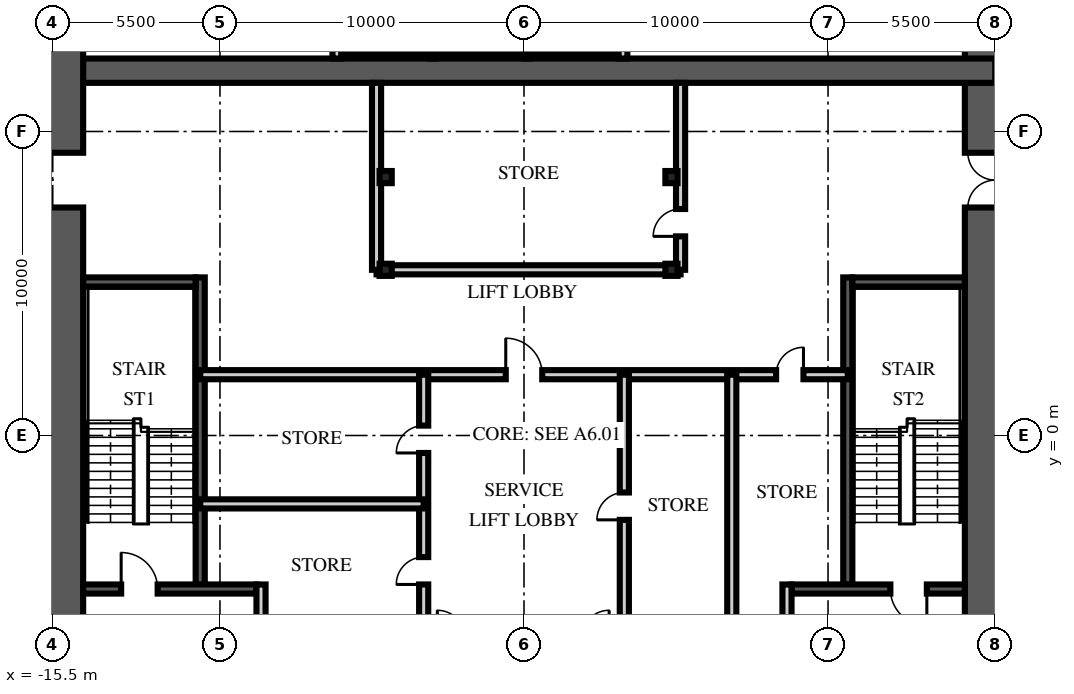
"""IFC4 building model, lengths in metres.
Left out: names, types, materials, properties, quantities, classifications, styles, units other than length and angle.
Written with IfcOpenShell. Run it as: python <this file> out.ifc"""

import sys

from ifc_helpers import new_model, si_unit, direction, frame, frame_2d, origin, origin_2d, place, context, subcontext, project, spatial, rectangle, extrude, element, fill, save


model = new_model("IFC4")
c1 = context("Model", 3, precision=1e-05, world=origin(), true_north=direction((0.0, 1.0)))
c2 = subcontext(c1, "Body", "Model", "MODEL_VIEW")
j1 = project(units=[si_unit("LENGTHUNIT", "METRE"), si_unit("PLANEANGLEUNIT", "RADIAN")], contexts=[c1])
p1 = place(None, origin())
s1 = spatial("IfcSite", under=j1, at=p1, CompositionType="ELEMENT")
p2 = place(p1, origin())
s2 = spatial("IfcBuilding", under=s1, at=p2, CompositionType="ELEMENT")
p3 = place(p2, frame((0.0, 0.0, -13.2)))
s3 = spatial("IfcBuildingStorey", under=s2, at=p3, CompositionType="ELEMENT", Elevation=-13.2)
p4 = place(p3, frame((15.5, -15.5, -0.4), z_axis=(0.0, 0.0, 1.0), x_axis=(0.0, 1.0, 0.0)))
e1 = element("IfcWall", 1, at=p4, inside=s3, PredefinedType="SHEAR", context=c2, shape_type="SweptSolid", body=[
    extrude(rectangle(XDim=31.0, YDim=2.0, at=frame_2d((15.5, 0.0))), origin(), (0.0, 0.0, 1.0), 4.3),
])
p5 = place(p4, frame((6.5, 0.0, 0.4)))
e2 = element("IfcOpeningElement", 2, at=p5, cuts=e1, PredefinedType="OPENING", context=c2, shape_type="SweptSolid", body=[
    extrude(rectangle(XDim=1.2, YDim=2.1, at=frame_2d((0.6, 1.05))), frame((0.0, 1.01, 0.0), z_axis=(0.0, -1.0, 0.0), x_axis=(1.0, 0.0, 0.0)), (0.0, 0.0, 1.0), 2.02),
])
p6 = place(p4, frame((23.0, 0.0, 0.4)))
e3 = element("IfcOpeningElement", 3, at=p6, cuts=e1, PredefinedType="OPENING", context=c2, shape_type="SweptSolid", body=[
    extrude(rectangle(XDim=1.8, YDim=2.1, at=frame_2d((0.9, 1.05))), frame((0.0, 1.01, 0.0), z_axis=(0.0, -1.0, 0.0), x_axis=(1.0, 0.0, 0.0)), (0.0, 0.0, 1.0), 2.02),
])
p7 = place(p3, frame((-15.5, 12.0, -0.4), z_axis=(0.0, 0.0, 1.0), x_axis=(1.0, 0.0, 0.0)))
e4 = element("IfcWall", 4, at=p7, inside=s3, PredefinedType="SHEAR", context=c2, shape_type="SweptSolid", body=[
    extrude(rectangle(XDim=31.0, YDim=0.8, at=frame_2d((15.5, 0.0))), origin(), (0.0, 0.0, 1.0), 4.3),
])
p8 = place(p3, frame((-15.5, -15.5, -0.4), z_axis=(0.0, 0.0, 1.0), x_axis=(0.0, 1.0, 0.0)))
e5 = element("IfcWall", 5, at=p8, inside=s3, PredefinedType="SHEAR", context=c2, shape_type="SweptSolid", body=[
    extrude(rectangle(XDim=31.0, YDim=2.0, at=frame_2d((15.5, 0.0))), origin(), (0.0, 0.0, 1.0), 4.3),
])
p9 = place(p8, frame((6.5, 0.0, 0.4)))
e6 = element("IfcOpeningElement", 6, at=p9, cuts=e5, PredefinedType="OPENING", context=c2, shape_type="SweptSolid", body=[
    extrude(rectangle(XDim=1.2, YDim=2.1, at=frame_2d((0.6, 1.05))), frame((0.0, 1.01, 0.0), z_axis=(0.0, -1.0, 0.0), x_axis=(1.0, 0.0, 0.0)), (0.0, 0.0, 1.0), 2.02),
])
p10 = place(p8, frame((23.0, 0.0, 0.4)))
e7 = element("IfcOpeningElement", 7, at=p10, cuts=e5, PredefinedType="OPENING", context=c2, shape_type="SweptSolid", body=[
    extrude(rectangle(XDim=1.8, YDim=2.1, at=frame_2d((0.9, 1.05))), frame((0.0, 1.01, 0.0), z_axis=(0.0, -1.0, 0.0), x_axis=(1.0, 0.0, 0.0)), (0.0, 0.0, 1.0), 2.02),
])
p11 = place(p3, frame((-10.65, -4.9, 0.0), z_axis=(0.0, 0.0, 1.0), x_axis=(0.0, 1.0, 0.0)))
e8 = element("IfcWall", 8, at=p11, inside=s3, PredefinedType="SOLIDWALL", context=c2, shape_type="SweptSolid", body=[
    extrude(rectangle(XDim=10.1, YDim=0.3, at=frame_2d((5.05, 0.0))), origin(), (0.0, 0.0, 1.0), 3.9),
])
p12 = place(p3, frame((-14.5, -5.05, 0.0), z_axis=(0.0, 0.0, 1.0), x_axis=(1.0, 0.0, 0.0)))
e9 = element("IfcWall", 9, at=p12, inside=s3, PredefinedType="SOLIDWALL", context=c2, shape_type="SweptSolid", body=[
    extrude(rectangle(XDim=5.7, YDim=0.3, at=frame_2d((2.85, 0.0))), origin(), (0.0, 0.0, 1.0), 3.9),
])
p13 = place(p12, frame((1.25, 0.0, 0.0)))
e10 = element("IfcOpeningElement", 10, at=p13, cuts=e9, PredefinedType="OPENING", context=c2, shape_type="SweptSolid", body=[
    extrude(rectangle(XDim=1.2, YDim=2.1, at=frame_2d((0.6, 1.05))), frame((0.0, 0.16, 0.0), z_axis=(0.0, -1.0, 0.0), x_axis=(1.0, 0.0, 0.0)), (0.0, 0.0, 1.0), 0.32),
])
p14 = place(p3, frame((-14.5, 5.05, 0.0), z_axis=(0.0, 0.0, 1.0), x_axis=(1.0, 0.0, 0.0)))
e11 = element("IfcWall", 11, at=p14, inside=s3, PredefinedType="SOLIDWALL", context=c2, shape_type="SweptSolid", body=[
    extrude(rectangle(XDim=3.7, YDim=0.3, at=frame_2d((1.85, 0.0))), origin(), (0.0, 0.0, 1.0), 3.9),
])
p15 = place(p3, frame((-8.65, -11.6, 0.0), z_axis=(0.0, 0.0, 1.0), x_axis=(0.0, 1.0, 0.0)))
e12 = element("IfcWall", 12, at=p15, inside=s3, PredefinedType="PARTITIONING", context=c2, shape_type="SweptSolid", body=[
    extrude(rectangle(XDim=6.7, YDim=0.3, at=frame_2d((3.35, 0.0))), origin(), (0.0, 0.0, 1.0), 3.9),
])
p16 = place(p15, frame((2.85, 0.0, 0.0)))
e13 = element("IfcOpeningElement", 13, at=p16, cuts=e12, PredefinedType="OPENING", context=c2, shape_type="SweptSolid", body=[
    extrude(rectangle(XDim=1.1, YDim=2.1, at=frame_2d((0.55, 1.05))), frame((0.0, 0.16, 0.0), z_axis=(0.0, -1.0, 0.0), x_axis=(1.0, 0.0, 0.0)), (0.0, 0.0, 1.0), 0.32),
])
p17 = place(p3, frame((10.65, -4.9, 0.0), z_axis=(0.0, 0.0, 1.0), x_axis=(0.0, 1.0, 0.0)))
e14 = element("IfcWall", 14, at=p17, inside=s3, PredefinedType="SOLIDWALL", context=c2, shape_type="SweptSolid", body=[
    extrude(rectangle(XDim=10.1, YDim=0.3, at=frame_2d((5.05, 0.0))), origin(), (0.0, 0.0, 1.0), 3.9),
])
p18 = place(p3, frame((14.5, -5.05, 0.0), z_axis=(0.0, 0.0, 1.0), x_axis=(-1.0, 0.0, 0.0)))
e15 = element("IfcWall", 15, at=p18, inside=s3, PredefinedType="SOLIDWALL", context=c2, shape_type="SweptSolid", body=[
    extrude(rectangle(XDim=5.7, YDim=0.3, at=frame_2d((2.85, 0.0))), origin(), (0.0, 0.0, 1.0), 3.9),
])
p19 = place(p18, frame((1.25, 0.0, 0.0)))
e16 = element("IfcOpeningElement", 16, at=p19, cuts=e15, PredefinedType="OPENING", context=c2, shape_type="SweptSolid", body=[
    extrude(rectangle(XDim=1.2, YDim=2.1, at=frame_2d((0.6, 1.05))), frame((0.0, 0.16, 0.0), z_axis=(0.0, -1.0, 0.0), x_axis=(1.0, 0.0, 0.0)), (0.0, 0.0, 1.0), 0.32),
])
p20 = place(p3, frame((14.5, 5.05, 0.0), z_axis=(0.0, 0.0, 1.0), x_axis=(-1.0, 0.0, 0.0)))
e17 = element("IfcWall", 17, at=p20, inside=s3, PredefinedType="SOLIDWALL", context=c2, shape_type="SweptSolid", body=[
    extrude(rectangle(XDim=3.7, YDim=0.3, at=frame_2d((1.85, 0.0))), origin(), (0.0, 0.0, 1.0), 3.9),
])
p21 = place(p3, frame((8.65, -11.6, 0.0), z_axis=(0.0, 0.0, 1.0), x_axis=(0.0, 1.0, 0.0)))
e18 = element("IfcWall", 18, at=p21, inside=s3, PredefinedType="PARTITIONING", context=c2, shape_type="SweptSolid", body=[
    extrude(rectangle(XDim=6.7, YDim=0.3, at=frame_2d((3.35, 0.0))), origin(), (0.0, 0.0, 1.0), 3.9),
])
p22 = place(p21, frame((2.85, 0.0, 0.0)))
e19 = element("IfcOpeningElement", 19, at=p22, cuts=e18, PredefinedType="OPENING", context=c2, shape_type="SweptSolid", body=[
    extrude(rectangle(XDim=1.1, YDim=2.1, at=frame_2d((0.55, 1.05))), frame((0.0, 0.16, 0.0), z_axis=(0.0, -1.0, 0.0), x_axis=(1.0, 0.0, 0.0)), (0.0, 0.0, 1.0), 0.32),
])
for number, where, z_axis, x_axis in (
    (20, (-6.15, 12.4, 0.0), (0.0, 0.0, 1.0), (0.0, 1.0, 0.0)),
    (21, (3.25, 12.4, 0.0), (0.0, 0.0, 1.0), (0.0, 1.0, 0.0)),
):
    element("IfcWall", number, at=place(p3, frame(where, z_axis=z_axis, x_axis=x_axis)), inside=s3, PredefinedType="PARTITIONING", context=c2, shape_type="SweptSolid", body=[
        extrude(rectangle(XDim=2.1, YDim=0.3, at=frame_2d((1.05, 0.0))), origin(), (0.0, 0.0, 1.0), 3.9),
    ])
for number, where, z_axis, x_axis in (
    (22, (-3.0, 12.4, 0.0), (0.0, 0.0, 1.0), (0.0, 1.0, 0.0)),
    (23, (0.1, 12.4, 0.0), (0.0, 0.0, 1.0), (0.0, 1.0, 0.0)),
):
    element("IfcWall", number, at=place(p3, frame(where, z_axis=z_axis, x_axis=x_axis)), inside=s3, PredefinedType="PARTITIONING", context=c2, shape_type="SweptSolid", body=[
        extrude(rectangle(XDim=2.1, YDim=0.2, at=frame_2d((1.05, 0.0))), origin(), (0.0, 0.0, 1.0), 3.9),
    ])
p23 = place(p3, frame((-10.65, 2.0, 0.0), z_axis=(0.0, 0.0, 1.0), x_axis=(1.0, 0.0, 0.0)))
e24 = element("IfcWall", 24, at=p23, inside=s3, PredefinedType="PARTITIONING", context=c2, shape_type="SweptSolid", body=[
    extrude(rectangle(XDim=21.3, YDim=0.3, at=frame_2d((10.65, 0.0))), origin(), (0.0, 0.0, 1.0), 3.9),
])
p24 = place(p23, frame((10.05, 0.0, 0.0)))
e25 = element("IfcOpeningElement", 25, at=p24, cuts=e24, PredefinedType="OPENING", context=c2, shape_type="SweptSolid", body=[
    extrude(rectangle(XDim=1.2, YDim=2.1, at=frame_2d((0.6, 1.05))), frame((0.0, 0.16, 0.0), z_axis=(0.0, -1.0, 0.0), x_axis=(1.0, 0.0, 0.0)), (0.0, 0.0, 1.0), 0.32),
])
p25 = place(p23, frame((18.942, 0.0, 0.0)))
e26 = element("IfcOpeningElement", 26, at=p25, cuts=e24, PredefinedType="OPENING", context=c2, shape_type="SweptSolid", body=[
    extrude(rectangle(XDim=0.9, YDim=2.1, at=frame_2d((0.45, 1.05))), frame((0.0, 0.16, 0.0), z_axis=(0.0, -1.0, 0.0), x_axis=(1.0, 0.0, 0.0)), (0.0, 0.0, 1.0), 0.32),
])
p26 = place(p3, frame((-3.3, -6.65, 0.0), z_axis=(0.0, 0.0, 1.0), x_axis=(0.0, 1.0, 0.0)))
e27 = element("IfcWall", 27, at=p26, inside=s3, PredefinedType="PARTITIONING", context=c2, shape_type="SweptSolid", body=[
    extrude(rectangle(XDim=8.65, YDim=0.3, at=frame_2d((4.325, 0.0))), origin(), (0.0, 0.0, 1.0), 3.9),
])
p27 = place(p26, frame((1.75, 0.0, 0.0)))
e28 = element("IfcOpeningElement", 28, at=p27, cuts=e27, PredefinedType="OPENING", context=c2, shape_type="SweptSolid", body=[
    extrude(rectangle(XDim=0.9, YDim=2.1, at=frame_2d((0.45, 1.05))), frame((0.0, 0.16, 0.0), z_axis=(0.0, -1.0, 0.0), x_axis=(1.0, 0.0, 0.0)), (0.0, 0.0, 1.0), 0.32),
])
p28 = place(p26, frame((6.075, 0.0, 0.0)))
e29 = element("IfcOpeningElement", 29, at=p28, cuts=e27, PredefinedType="OPENING", context=c2, shape_type="SweptSolid", body=[
    extrude(rectangle(XDim=0.9, YDim=2.1, at=frame_2d((0.45, 1.05))), frame((0.0, 0.16, 0.0), z_axis=(0.0, -1.0, 0.0), x_axis=(1.0, 0.0, 0.0)), (0.0, 0.0, 1.0), 0.32),
])
p29 = place(p3, frame((3.3, -6.65, 0.0), z_axis=(0.0, 0.0, 1.0), x_axis=(0.0, 1.0, 0.0)))
e30 = element("IfcWall", 30, at=p29, inside=s3, PredefinedType="PARTITIONING", context=c2, shape_type="SweptSolid", body=[
    extrude(rectangle(XDim=8.65, YDim=0.3, at=frame_2d((4.325, 0.0))), origin(), (0.0, 0.0, 1.0), 3.9),
])
p30 = place(p29, frame((3.875, 0.0, 0.0)))
e31 = element("IfcOpeningElement", 31, at=p30, cuts=e30, PredefinedType="OPENING", context=c2, shape_type="SweptSolid", body=[
    extrude(rectangle(XDim=0.9, YDim=2.1, at=frame_2d((0.45, 1.05))), frame((0.0, 0.16, 0.0), z_axis=(0.0, -1.0, 0.0), x_axis=(1.0, 0.0, 0.0)), (0.0, 0.0, 1.0), 0.32),
])
p31 = place(p3, frame((-10.65, -2.25, 0.0), z_axis=(0.0, 0.0, 1.0), x_axis=(1.0, 0.0, 0.0)))
e32 = element("IfcWall", 32, at=p31, inside=s3, PredefinedType="PARTITIONING", context=c2, shape_type="SweptSolid", body=[
    extrude(rectangle(XDim=7.35, YDim=0.3, at=frame_2d((3.675, 0.0))), origin(), (0.0, 0.0, 1.0), 3.9),
])
p32 = place(p3, frame((6.834, -6.65, 0.0), z_axis=(0.0, 0.0, 1.0), x_axis=(0.0, 1.0, 0.0)))
e33 = element("IfcWall", 33, at=p32, inside=s3, PredefinedType="PARTITIONING", context=c2, shape_type="SweptSolid", body=[
    extrude(rectangle(XDim=8.65, YDim=0.3, at=frame_2d((4.325, 0.0))), origin(), (0.0, 0.0, 1.0), 3.9),
])
p33 = place(p3, frame((-4.85, 5.45, 0.0), z_axis=(0.0, 0.0, 1.0), x_axis=(1.0, 0.0, 0.0)))
e34 = element("IfcWall", 34, at=p33, inside=s3, PredefinedType="PARTITIONING", context=c2, shape_type="SweptSolid", body=[
    extrude(rectangle(XDim=10.0, YDim=0.3, at=frame_2d((5.0, 0.0))), origin(), (0.0, 0.0, 1.0), 3.9),
])
p34 = place(p3, frame((-4.85, 5.45, 0.0), z_axis=(0.0, 0.0, 1.0), x_axis=(0.0, 1.0, 0.0)))
e35 = element("IfcWall", 35, at=p34, inside=s3, PredefinedType="PARTITIONING", context=c2, shape_type="SweptSolid", body=[
    extrude(rectangle(XDim=6.15, YDim=0.3, at=frame_2d((3.075, 0.0))), origin(), (0.0, 0.0, 1.0), 3.9),
])
p35 = place(p3, frame((5.15, 5.45, 0.0), z_axis=(0.0, 0.0, 1.0), x_axis=(0.0, 1.0, 0.0)))
e36 = element("IfcWall", 36, at=p35, inside=s3, PredefinedType="PARTITIONING", context=c2, shape_type="SweptSolid", body=[
    extrude(rectangle(XDim=6.15, YDim=0.3, at=frame_2d((3.075, 0.0))), origin(), (0.0, 0.0, 1.0), 3.9),
])
p36 = place(p35, frame((1.1, 0.0, 0.0)))
e37 = element("IfcOpeningElement", 37, at=p36, cuts=e36, PredefinedType="OPENING", context=c2, shape_type="SweptSolid", body=[
    extrude(rectangle(XDim=0.9, YDim=2.1, at=frame_2d((0.45, 1.05))), frame((0.0, 0.16, 0.0), z_axis=(0.0, -1.0, 0.0), x_axis=(1.0, 0.0, 0.0)), (0.0, 0.0, 1.0), 0.32),
])
for number, where, z_axis, x_axis in (
    (38, (-4.55, 5.45, 0.0), (0.0, 0.0, 1.0), (1.0, 0.0, 0.0)),
    (39, (4.85, 5.45, 0.0), (0.0, 0.0, 1.0), (1.0, 0.0, 0.0)),
    (40, (-4.55, 8.5, 0.0), (0.0, 0.0, 1.0), (1.0, 0.0, 0.0)),
    (41, (4.85, 8.5, 0.0), (0.0, 0.0, 1.0), (1.0, 0.0, 0.0)),
):
    element("IfcColumn", number, at=place(p3, frame(where, z_axis=z_axis, x_axis=x_axis)), inside=s3, PredefinedType="COLUMN", context=c2, shape_type="SweptSolid", body=[
        extrude(rectangle(XDim=0.4, YDim=0.4, at=origin_2d()), origin(), (0.0, 0.0, 1.0), 3.9),
    ])
p37 = place(p3, frame((-6.0, 12.5, -1.8), z_axis=(0.0, 0.0, 1.0), x_axis=(1.0, 0.0, 0.0)))
e42 = element("IfcWall", 42, at=p37, inside=s3, PredefinedType="SOLIDWALL", context=c2, shape_type="SweptSolid", body=[
    extrude(rectangle(XDim=2.9, YDim=0.1, at=frame_2d((1.45, 0.0))), origin(), (0.0, 0.0, 1.0), 1.8),
])
for number, where, z_axis, x_axis in (
    (43, (-5.95, 14.35, -1.8), (0.0, 0.0, 1.0), (0.0, -1.0, 0.0)),
    (44, (-3.15, 12.55, -1.8), (0.0, 0.0, 1.0), (0.0, 1.0, 0.0)),
):
    element("IfcWall", number, at=place(p3, frame(where, z_axis=z_axis, x_axis=x_axis)), inside=s3, PredefinedType="SOLIDWALL", context=c2, shape_type="SweptSolid", body=[
        extrude(rectangle(XDim=1.8, YDim=0.1, at=frame_2d((0.9, 0.0))), origin(), (0.0, 0.0, 1.0), 1.8),
    ])
p38 = place(p3, frame((-2.9, 12.5, -1.8), z_axis=(0.0, 0.0, 1.0), x_axis=(1.0, 0.0, 0.0)))
e45 = element("IfcWall", 45, at=p38, inside=s3, PredefinedType="SOLIDWALL", context=c2, shape_type="SweptSolid", body=[
    extrude(rectangle(XDim=2.9, YDim=0.1, at=frame_2d((1.45, 0.0))), origin(), (0.0, 0.0, 1.0), 1.8),
])
for number, where, z_axis, x_axis in (
    (46, (-2.85, 14.35, -1.8), (0.0, 0.0, 1.0), (0.0, -1.0, 0.0)),
    (47, (-0.05, 12.55, -1.8), (0.0, 0.0, 1.0), (0.0, 1.0, 0.0)),
):
    element("IfcWall", number, at=place(p3, frame(where, z_axis=z_axis, x_axis=x_axis)), inside=s3, PredefinedType="SOLIDWALL", context=c2, shape_type="SweptSolid", body=[
        extrude(rectangle(XDim=1.8, YDim=0.1, at=frame_2d((0.9, 0.0))), origin(), (0.0, 0.0, 1.0), 1.8),
    ])
p39 = place(p3, frame((0.2, 12.5, -1.8), z_axis=(0.0, 0.0, 1.0), x_axis=(1.0, 0.0, 0.0)))
e48 = element("IfcWall", 48, at=p39, inside=s3, PredefinedType="SOLIDWALL", context=c2, shape_type="SweptSolid", body=[
    extrude(rectangle(XDim=2.9, YDim=0.1, at=frame_2d((1.45, 0.0))), origin(), (0.0, 0.0, 1.0), 1.8),
])
for number, where, z_axis, x_axis in (
    (49, (0.25, 14.35, -1.8), (0.0, 0.0, 1.0), (0.0, -1.0, 0.0)),
    (50, (3.05, 12.55, -1.8), (0.0, 0.0, 1.0), (0.0, 1.0, 0.0)),
):
    element("IfcWall", number, at=place(p3, frame(where, z_axis=z_axis, x_axis=x_axis)), inside=s3, PredefinedType="SOLIDWALL", context=c2, shape_type="SweptSolid", body=[
        extrude(rectangle(XDim=1.8, YDim=0.1, at=frame_2d((0.9, 0.0))), origin(), (0.0, 0.0, 1.0), 1.8),
    ])
p40 = place(p13, origin())
e51 = element("IfcDoor", 51, at=p40, inside=s3, OperationType="SINGLE_SWING_LEFT", PredefinedType="DOOR", context=c2, shape_type="SweptSolid", body=[
    extrude(rectangle(XDim=1.2, YDim=2.1, at=frame_2d((0.6, 1.05))), frame((0.0, 0.025, 0.0), z_axis=(0.0, -1.0, 0.0), x_axis=(1.0, 0.0, 0.0)), (0.0, 0.0, 1.0), 0.05),
])
fill(e10, e51)
p41 = place(p10, origin())
e52 = element("IfcDoor", 52, at=p41, inside=s3, OperationType="DOUBLE_DOOR_SINGLE_SWING", PredefinedType="DOOR", context=c2, shape_type="SweptSolid", body=[
    extrude(rectangle(XDim=1.8, YDim=2.1, at=frame_2d((0.9, 1.05))), frame((0.0, 0.025, 0.0), z_axis=(0.0, -1.0, 0.0), x_axis=(1.0, 0.0, 0.0)), (0.0, 0.0, 1.0), 0.05),
])
fill(e7, e52)
p42 = place(p19, origin())
e53 = element("IfcDoor", 53, at=p42, inside=s3, OperationType="SINGLE_SWING_LEFT", PredefinedType="DOOR", context=c2, shape_type="SweptSolid", body=[
    extrude(rectangle(XDim=1.2, YDim=2.1, at=frame_2d((0.6, 1.05))), frame((0.0, 0.025, 0.0), z_axis=(0.0, -1.0, 0.0), x_axis=(1.0, 0.0, 0.0)), (0.0, 0.0, 1.0), 0.05),
])
fill(e16, e53)
p43 = place(p6, origin())
e54 = element("IfcDoor", 54, at=p43, inside=s3, OperationType="DOUBLE_DOOR_SINGLE_SWING", PredefinedType="DOOR", context=c2, shape_type="SweptSolid", body=[
    extrude(rectangle(XDim=1.8, YDim=2.1, at=frame_2d((0.9, 1.05))), frame((0.0, 0.025, 0.0), z_axis=(0.0, -1.0, 0.0), x_axis=(1.0, 0.0, 0.0)), (0.0, 0.0, 1.0), 0.05),
])
fill(e3, e54)
p44 = place(p24, origin())
e55 = element("IfcDoor", 55, at=p44, inside=s3, OperationType="SINGLE_SWING_LEFT", PredefinedType="DOOR", context=c2, shape_type="SweptSolid", body=[
    extrude(rectangle(XDim=1.2, YDim=2.1, at=frame_2d((0.6, 1.05))), frame((0.0, 0.025, 0.0), z_axis=(0.0, -1.0, 0.0), x_axis=(1.0, 0.0, 0.0)), (0.0, 0.0, 1.0), 0.05),
])
fill(e25, e55)
p45 = place(p27, origin())
e56 = element("IfcDoor", 56, at=p45, inside=s3, OperationType="SINGLE_SWING_LEFT", PredefinedType="DOOR", context=c2, shape_type="SweptSolid", body=[
    extrude(rectangle(XDim=0.9, YDim=2.1, at=frame_2d((0.45, 1.05))), frame((0.0, 0.025, 0.0), z_axis=(0.0, -1.0, 0.0), x_axis=(1.0, 0.0, 0.0)), (0.0, 0.0, 1.0), 0.05),
])
fill(e28, e56)
p46 = place(p28, origin())
e57 = element("IfcDoor", 57, at=p46, inside=s3, OperationType="SINGLE_SWING_LEFT", PredefinedType="DOOR", context=c2, shape_type="SweptSolid", body=[
    extrude(rectangle(XDim=0.9, YDim=2.1, at=frame_2d((0.45, 1.05))), frame((0.0, 0.025, 0.0), z_axis=(0.0, -1.0, 0.0), x_axis=(1.0, 0.0, 0.0)), (0.0, 0.0, 1.0), 0.05),
])
fill(e29, e57)
p47 = place(p30, origin())
e58 = element("IfcDoor", 58, at=p47, inside=s3, OperationType="SINGLE_SWING_LEFT", PredefinedType="DOOR", context=c2, shape_type="SweptSolid", body=[
    extrude(rectangle(XDim=0.9, YDim=2.1, at=frame_2d((0.45, 1.05))), frame((0.0, 0.025, 0.0), z_axis=(0.0, -1.0, 0.0), x_axis=(1.0, 0.0, 0.0)), (0.0, 0.0, 1.0), 0.05),
])
fill(e31, e58)
p48 = place(p25, origin())
e59 = element("IfcDoor", 59, at=p48, inside=s3, OperationType="SINGLE_SWING_RIGHT", PredefinedType="DOOR", context=c2, shape_type="SweptSolid", body=[
    extrude(rectangle(XDim=0.9, YDim=2.1, at=frame_2d((0.45, 1.05))), frame((0.0, 0.025, 0.0), z_axis=(0.0, -1.0, 0.0), x_axis=(1.0, 0.0, 0.0)), (0.0, 0.0, 1.0), 0.05),
])
fill(e26, e59)
p49 = place(p36, origin())
e60 = element("IfcDoor", 60, at=p49, inside=s3, OperationType="SINGLE_SWING_LEFT", PredefinedType="DOOR", context=c2, shape_type="SweptSolid", body=[
    extrude(rectangle(XDim=0.9, YDim=2.1, at=frame_2d((0.45, 1.05))), frame((0.0, 0.025, 0.0), z_axis=(0.0, -1.0, 0.0), x_axis=(1.0, 0.0, 0.0)), (0.0, 0.0, 1.0), 0.05),
])
fill(e37, e60)
save(model, sys.argv[1])
